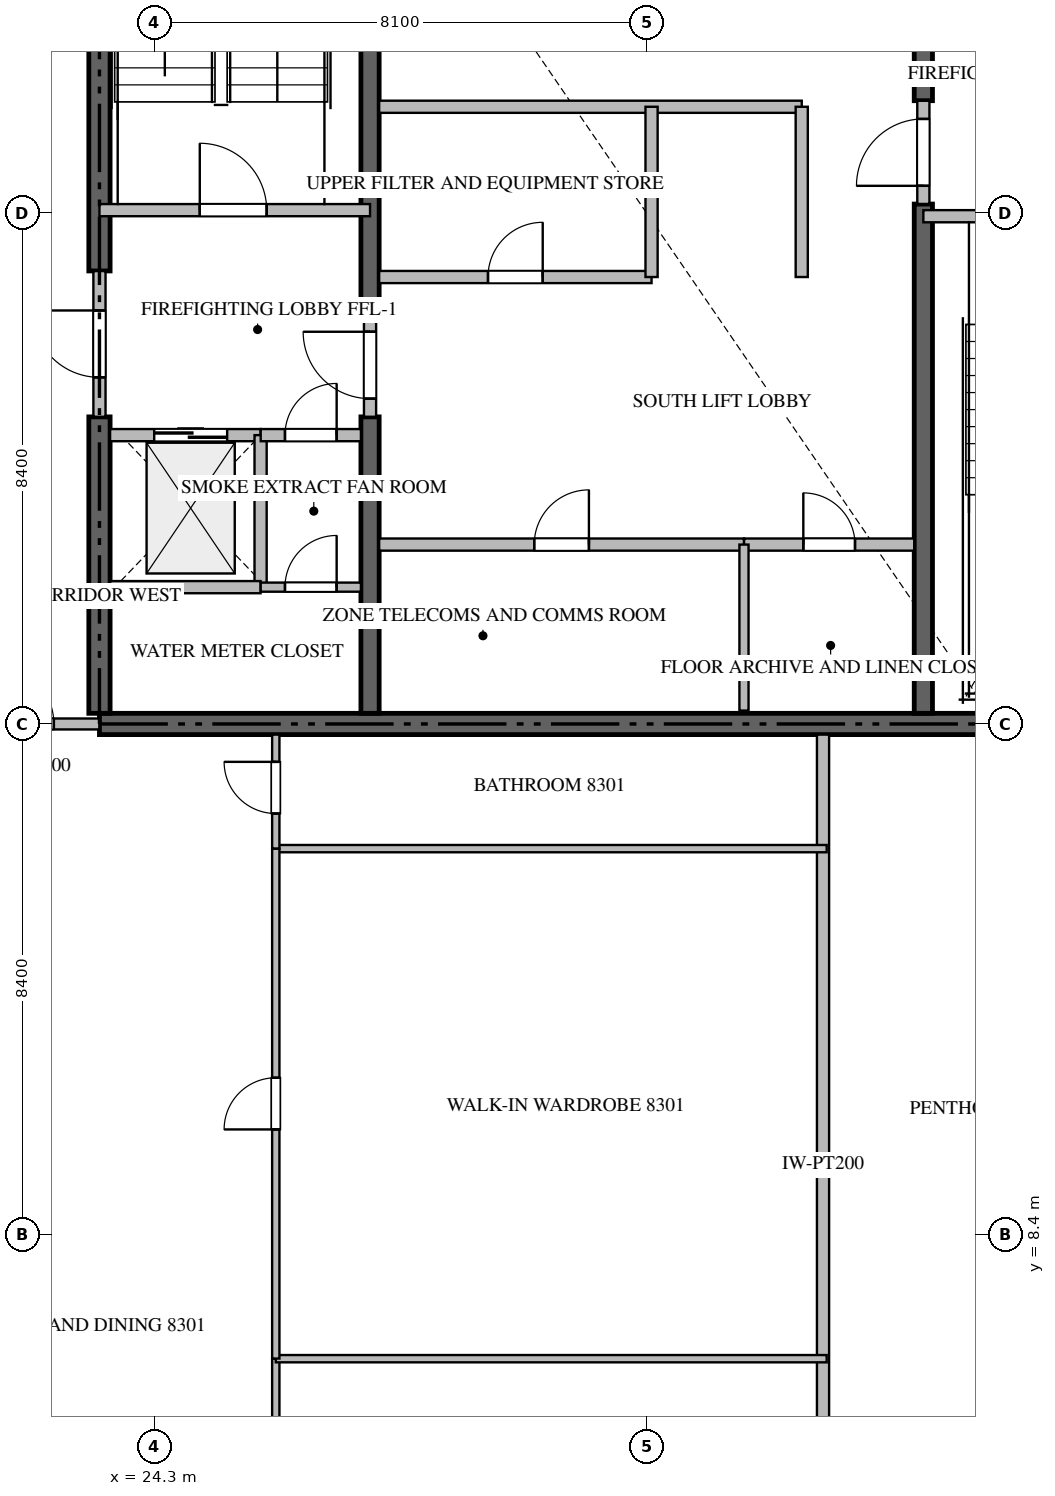
"""IFC4 building model, lengths in metres.
Left out: names, types, materials, properties, quantities, classifications, styles, units other than length and angle.
Written with IfcOpenShell. Run it as: python <this file> out.ifc"""

import sys

from ifc_helpers import new_model, si_unit, direction, frame, frame_2d, origin, place, context, subcontext, project, spatial, rectangle, extrude, source, transform, mapped, element, fill, save


model = new_model("IFC4")
c1 = context("Model", 3, precision=1e-05, world=origin(), true_north=direction((0.0, 1.0)))
c2 = subcontext(c1, "Body", "Model", "MODEL_VIEW")
j1 = project(units=[si_unit("LENGTHUNIT", "METRE"), si_unit("PLANEANGLEUNIT", "RADIAN")], contexts=[c1])
p1 = place(None, origin())
s1 = spatial("IfcSite", under=j1, at=p1, CompositionType="ELEMENT")
p2 = place(p1, origin())
s2 = spatial("IfcBuilding", under=s1, at=p2, CompositionType="ELEMENT")
p3 = place(p2, frame((0.0, 0.0, 333.95)))
s3 = spatial("IfcBuildingStorey", under=s2, at=p3, CompositionType="ELEMENT", Elevation=333.95)
p4 = place(p3, frame((23.4, 16.8, -0.26), z_axis=(0.0, 0.0, 1.0), x_axis=(1.0, 0.0, 0.0)))
e1 = element("IfcWall", 1, at=p4, inside=s3, PredefinedType="SHEAR", context=c2, shape_type="SweptSolid", body=[
    extrude(rectangle(XDim=18.0, YDim=0.35, at=frame_2d((9.0, 0.0))), origin(), (0.0, 0.0, 1.0), 3.868),
])
p5 = place(p3, frame((23.4, 16.975, -0.26), z_axis=(0.0, 0.0, 1.0), x_axis=(0.0, 1.0, 0.0)))
e2 = element("IfcWall", 2, at=p5, inside=s3, PredefinedType="SHEAR", context=c2, shape_type="SweptSolid", body=[
    extrude(rectangle(XDim=4.875, YDim=0.35, at=frame_2d((2.438, 0.0))), origin(), (0.0, 0.0, 1.0), 3.868),
])
p6 = place(p3, frame((23.4, 24.25, -0.26), z_axis=(0.0, 0.0, 1.0), x_axis=(0.0, 1.0, 0.0)))
e3 = element("IfcWall", 3, at=p6, inside=s3, PredefinedType="SHEAR", context=c2, shape_type="SweptSolid", body=[
    extrude(rectangle(XDim=9.175, YDim=0.35, at=frame_2d((4.587, 0.0))), origin(), (0.0, 0.0, 1.0), 3.868),
])
p7 = place(p3, frame((27.85, 16.975, -0.26), z_axis=(0.0, 0.0, 1.0), x_axis=(0.0, 1.0, 0.0)))
e4 = element("IfcWall", 4, at=p7, inside=s3, PredefinedType="SHEAR", context=c2, shape_type="SweptSolid", body=[
    extrude(rectangle(XDim=4.875, YDim=0.3, at=frame_2d((2.438, 0.0))), origin(), (0.0, 0.0, 1.0), 3.868),
])
p8 = place(p3, frame((27.85, 23.55, -0.26), z_axis=(0.0, 0.0, 1.0), x_axis=(0.0, 1.0, 0.0)))
e5 = element("IfcWall", 5, at=p8, inside=s3, PredefinedType="SHEAR", context=c2, shape_type="SweptSolid", body=[
    extrude(rectangle(XDim=9.875, YDim=0.3, at=frame_2d((4.938, 0.0))), origin(), (0.0, 0.0, 1.0), 3.868),
])
p9 = place(p3, frame((36.95, 16.975, -0.26), z_axis=(0.0, 0.0, 1.0), x_axis=(0.0, 1.0, 0.0)))
e6 = element("IfcWall", 6, at=p9, inside=s3, PredefinedType="SHEAR", context=c2, shape_type="SweptSolid", body=[
    extrude(rectangle(XDim=8.375, YDim=0.3, at=frame_2d((4.188, 0.0))), origin(), (0.0, 0.0, 1.0), 3.868),
])
p10 = place(p3, frame((36.95, 27.05, -0.26), z_axis=(0.0, 0.0, 1.0), x_axis=(0.0, 1.0, 0.0)))
e7 = element("IfcWall", 7, at=p10, inside=s3, PredefinedType="SHEAR", context=c2, shape_type="SweptSolid", body=[
    extrude(rectangle(XDim=6.375, YDim=0.3, at=frame_2d((3.188, 0.0))), origin(), (0.0, 0.0, 1.0), 3.868),
])
p11 = place(p3, frame((23.4, 25.25, 0.0), z_axis=(0.0, 0.0, 1.0), x_axis=(1.0, 0.0, 0.0)))
e8 = element("IfcWall", 8, at=p11, inside=s3, PredefinedType="STANDARD", context=c2, shape_type="SweptSolid", body=[
    extrude(rectangle(XDim=4.45, YDim=0.2, at=frame_2d((2.225, 0.0))), origin(), (0.0, 0.0, 1.0), 3.61),
])
p12 = place(p11, frame((1.65, 0.0, 0.0)))
e9 = element("IfcOpeningElement", 9, at=p12, cuts=e8, PredefinedType="OPENING", context=c2, shape_type="SweptSolid", body=[
    extrude(rectangle(XDim=1.1, YDim=2.15, at=frame_2d((0.55, 1.075))), frame((0.0, 0.11, 0.0), z_axis=(0.0, -1.0, 0.0), x_axis=(1.0, 0.0, 0.0)), (0.0, 0.0, 1.0), 0.22),
])
p13 = place(p3, frame((36.95, 25.15, 0.0), z_axis=(0.0, 0.0, 1.0), x_axis=(1.0, 0.0, 0.0)))
e10 = element("IfcWall", 10, at=p13, inside=s3, PredefinedType="STANDARD", context=c2, shape_type="SweptSolid", body=[
    extrude(rectangle(XDim=4.45, YDim=0.2, at=frame_2d((2.225, 0.0))), origin(), (0.0, 0.0, 1.0), 3.61),
])
p14 = place(p13, frame((1.65, 0.0, 0.0)))
e11 = element("IfcOpeningElement", 11, at=p14, cuts=e10, PredefinedType="OPENING", context=c2, shape_type="SweptSolid", body=[
    extrude(rectangle(XDim=1.1, YDim=2.15, at=frame_2d((0.55, 1.075))), frame((0.0, 0.11, 0.0), z_axis=(0.0, -1.0, 0.0), x_axis=(1.0, 0.0, 0.0)), (0.0, 0.0, 1.0), 0.22),
])
p15 = place(p3, frame((23.575, 21.55, 0.0), z_axis=(0.0, 0.0, 1.0), x_axis=(1.0, 0.0, 0.0)))
e12 = element("IfcWall", 12, at=p15, inside=s3, PredefinedType="STANDARD", context=c2, shape_type="SweptSolid", body=[
    extrude(rectangle(XDim=2.475, YDim=0.2, at=frame_2d((1.238, 0.0))), origin(), (0.0, 0.0, 1.0), 3.61),
])
p16 = place(p15, frame((0.725, 0.0, 0.0)))
e13 = element("IfcOpeningElement", 13, at=p16, cuts=e12, PredefinedType="OPENING", context=c2, shape_type="SweptSolid", body=[
    extrude(rectangle(XDim=1.2, YDim=2.2, at=frame_2d((0.6, 1.1))), frame((0.0, 0.11, 0.0), z_axis=(0.0, -1.0, 0.0), x_axis=(1.0, 0.0, 0.0)), (0.0, 0.0, 1.0), 0.22),
])
p17 = place(p3, frame((26.05, 19.05, 0.0), z_axis=(0.0, 0.0, 1.0), x_axis=(0.0, 1.0, 0.0)))
e14 = element("IfcWall", 14, at=p17, inside=s3, PredefinedType="STANDARD", context=c2, shape_type="SweptSolid", body=[
    extrude(rectangle(XDim=2.5, YDim=0.2, at=frame_2d((1.25, 0.0))), origin(), (0.0, 0.0, 1.0), 3.61),
])
p18 = place(p3, frame((23.575, 19.05, 0.0), z_axis=(0.0, 0.0, 1.0), x_axis=(1.0, 0.0, 0.0)))
e15 = element("IfcWall", 15, at=p18, inside=s3, PredefinedType="STANDARD", context=c2, shape_type="SweptSolid", body=[
    extrude(rectangle(XDim=2.475, YDim=0.2, at=frame_2d((1.238, 0.0))), origin(), (0.0, 0.0, 1.0), 3.61),
])
p19 = place(p3, frame((26.052, 21.55, 0.0), z_axis=(0.0, 0.0, 1.0), x_axis=(1.0, 0.0, 0.0)))
e16 = element("IfcWall", 16, at=p19, inside=s3, PredefinedType="STANDARD", context=c2, shape_type="SweptSolid", body=[
    extrude(rectangle(XDim=1.648, YDim=0.2, at=frame_2d((0.824, 0.0))), origin(), (0.0, 0.0, 1.0), 3.61),
])
p20 = place(p19, frame((0.399, 0.0, 0.0)))
e17 = element("IfcOpeningElement", 17, at=p20, cuts=e16, PredefinedType="OPENING", context=c2, shape_type="SweptSolid", body=[
    extrude(rectangle(XDim=0.85, YDim=2.1, at=frame_2d((0.425, 1.05))), frame((0.0, 0.11, 0.0), z_axis=(0.0, -1.0, 0.0), x_axis=(1.0, 0.0, 0.0)), (0.0, 0.0, 1.0), 0.22),
])
p21 = place(p3, frame((23.4, 21.852, 0.0), z_axis=(0.0, 0.0, 1.0), x_axis=(0.0, 1.0, 0.0)))
e18 = element("IfcWall", 18, at=p21, inside=s3, PredefinedType="STANDARD", context=c2, shape_type="SweptSolid", body=[
    extrude(rectangle(XDim=2.396, YDim=0.2, at=frame_2d((1.198, 0.0))), origin(), (0.0, 0.0, 1.0), 3.61),
])
p22 = place(p21, frame((0.648, 0.0, 0.0)))
e19 = element("IfcOpeningElement", 19, at=p22, cuts=e18, PredefinedType="OPENING", context=c2, shape_type="SweptSolid", body=[
    extrude(rectangle(XDim=1.1, YDim=2.15, at=frame_2d((0.55, 1.075))), frame((0.0, 0.11, 0.0), z_axis=(0.0, -1.0, 0.0), x_axis=(1.0, 0.0, 0.0)), (0.0, 0.0, 1.0), 0.22),
])
p23 = place(p3, frame((27.85, 21.852, 0.0), z_axis=(0.0, 0.0, 1.0), x_axis=(0.0, 1.0, 0.0)))
e20 = element("IfcWall", 20, at=p23, inside=s3, PredefinedType="STANDARD", context=c2, shape_type="SweptSolid", body=[
    extrude(rectangle(XDim=1.696, YDim=0.2, at=frame_2d((0.848, 0.0))), origin(), (0.0, 0.0, 1.0), 3.61),
])
p24 = place(p23, frame((0.298, 0.0, 0.0)))
e21 = element("IfcOpeningElement", 21, at=p24, cuts=e20, PredefinedType="OPENING", context=c2, shape_type="SweptSolid", body=[
    extrude(rectangle(XDim=1.1, YDim=2.15, at=frame_2d((0.55, 1.075))), frame((0.0, 0.11, 0.0), z_axis=(0.0, -1.0, 0.0), x_axis=(1.0, 0.0, 0.0)), (0.0, 0.0, 1.0), 0.22),
])
p25 = place(p3, frame((36.95, 25.352, 0.0), z_axis=(0.0, 0.0, 1.0), x_axis=(0.0, 1.0, 0.0)))
e22 = element("IfcWall", 22, at=p25, inside=s3, PredefinedType="STANDARD", context=c2, shape_type="SweptSolid", body=[
    extrude(rectangle(XDim=1.696, YDim=0.2, at=frame_2d((0.848, 0.0))), origin(), (0.0, 0.0, 1.0), 3.61),
])
p26 = place(p25, frame((0.298, 0.0, 0.0)))
e23 = element("IfcOpeningElement", 23, at=p26, cuts=e22, PredefinedType="OPENING", context=c2, shape_type="SweptSolid", body=[
    extrude(rectangle(XDim=1.1, YDim=2.15, at=frame_2d((0.55, 1.075))), frame((0.0, 0.11, 0.0), z_axis=(0.0, -1.0, 0.0), x_axis=(1.0, 0.0, 0.0)), (0.0, 0.0, 1.0), 0.22),
])
p27 = place(p3, frame((26.052, 19.05, 0.0), z_axis=(0.0, 0.0, 1.0), x_axis=(1.0, 0.0, 0.0)))
e24 = element("IfcWall", 24, at=p27, inside=s3, PredefinedType="PARTITIONING", context=c2, shape_type="SweptSolid", body=[
    extrude(rectangle(XDim=1.648, YDim=0.15, at=frame_2d((0.824, 0.0))), origin(), (0.0, 0.0, 1.0), 3.61),
])
p28 = place(p27, frame((0.399, 0.0, 0.0)))
e25 = element("IfcOpeningElement", 25, at=p28, cuts=e24, PredefinedType="OPENING", context=c2, shape_type="SweptSolid", body=[
    extrude(rectangle(XDim=0.85, YDim=2.1, at=frame_2d((0.425, 1.05))), frame((0.0, 0.085, 0.0), z_axis=(0.0, -1.0, 0.0), x_axis=(1.0, 0.0, 0.0)), (0.0, 0.0, 1.0), 0.17),
])
p29 = place(p3, frame((28.0, 19.75, 0.0), z_axis=(0.0, 0.0, 1.0), x_axis=(1.0, 0.0, 0.0)))
e26 = element("IfcWall", 26, at=p29, inside=s3, PredefinedType="STANDARD", context=c2, shape_type="SweptSolid", body=[
    extrude(rectangle(XDim=6.0, YDim=0.2, at=frame_2d((3.0, 0.0))), origin(), (0.0, 0.0, 1.0), 3.61),
])
p30 = place(p29, frame((2.55, 0.0, 0.0)))
e27 = element("IfcOpeningElement", 27, at=p30, cuts=e26, PredefinedType="OPENING", context=c2, shape_type="SweptSolid", body=[
    extrude(rectangle(XDim=0.9, YDim=2.1, at=frame_2d((0.45, 1.05))), frame((0.0, 0.11, 0.0), z_axis=(0.0, -1.0, 0.0), x_axis=(1.0, 0.0, 0.0)), (0.0, 0.0, 1.0), 0.22),
])
p31 = place(p3, frame((34.002, 19.75, 0.0), z_axis=(0.0, 0.0, 1.0), x_axis=(1.0, 0.0, 0.0)))
e28 = element("IfcWall", 28, at=p31, inside=s3, PredefinedType="STANDARD", context=c2, shape_type="SweptSolid", body=[
    extrude(rectangle(XDim=2.798, YDim=0.2, at=frame_2d((1.399, 0.0))), origin(), (0.0, 0.0, 1.0), 3.61),
])
p32 = place(p31, frame((0.974, 0.0, 0.0)))
e29 = element("IfcOpeningElement", 29, at=p32, cuts=e28, PredefinedType="OPENING", context=c2, shape_type="SweptSolid", body=[
    extrude(rectangle(XDim=0.85, YDim=2.1, at=frame_2d((0.425, 1.05))), frame((0.0, 0.11, 0.0), z_axis=(0.0, -1.0, 0.0), x_axis=(1.0, 0.0, 0.0)), (0.0, 0.0, 1.0), 0.22),
])
p33 = place(p3, frame((34.0, 17.02, 0.0), z_axis=(0.0, 0.0, 1.0), x_axis=(0.0, 1.0, 0.0)))
e30 = element("IfcWall", 30, at=p33, inside=s3, PredefinedType="PARTITIONING", context=c2, shape_type="SweptSolid", body=[
    extrude(rectangle(XDim=2.73, YDim=0.15, at=frame_2d((1.365, 0.0))), origin(), (0.0, 0.0, 1.0), 3.61),
])
p34 = place(p3, frame((28.0, 26.95, 0.0), z_axis=(0.0, 0.0, 1.0), x_axis=(1.0, 0.0, 0.0)))
e31 = element("IfcWall", 31, at=p34, inside=s3, PredefinedType="STANDARD", context=c2, shape_type="SweptSolid", body=[
    extrude(rectangle(XDim=6.95, YDim=0.2, at=frame_2d((3.475, 0.0))), origin(), (0.0, 0.0, 1.0), 3.61),
])
p35 = place(p3, frame((34.95, 24.15, 0.0), z_axis=(0.0, 0.0, 1.0), x_axis=(0.0, 1.0, 0.0)))
e32 = element("IfcWall", 32, at=p35, inside=s3, PredefinedType="STANDARD", context=c2, shape_type="SweptSolid", body=[
    extrude(rectangle(XDim=2.8, YDim=0.2, at=frame_2d((1.4, 0.0))), origin(), (0.0, 0.0, 1.0), 3.61),
])
p36 = place(p3, frame((28.0, 24.15, 0.0), z_axis=(0.0, 0.0, 1.0), x_axis=(1.0, 0.0, 0.0)))
e33 = element("IfcWall", 33, at=p36, inside=s3, PredefinedType="STANDARD", context=c2, shape_type="SweptSolid", body=[
    extrude(rectangle(XDim=4.48, YDim=0.2, at=frame_2d((2.24, 0.0))), origin(), (0.0, 0.0, 1.0), 3.61),
])
p37 = place(p36, frame((1.79, 0.0, 0.0)))
e34 = element("IfcOpeningElement", 34, at=p37, cuts=e33, PredefinedType="OPENING", context=c2, shape_type="SweptSolid", body=[
    extrude(rectangle(XDim=0.9, YDim=2.1, at=frame_2d((0.45, 1.05))), frame((0.0, 0.11, 0.0), z_axis=(0.0, -1.0, 0.0), x_axis=(1.0, 0.0, 0.0)), (0.0, 0.0, 1.0), 0.22),
])
p38 = place(p3, frame((32.48, 24.15, 0.0), z_axis=(0.0, 0.0, 1.0), x_axis=(0.0, 1.0, 0.0)))
e35 = element("IfcWall", 35, at=p38, inside=s3, PredefinedType="STANDARD", context=c2, shape_type="SweptSolid", body=[
    extrude(rectangle(XDim=2.8, YDim=0.2, at=frame_2d((1.4, 0.0))), origin(), (0.0, 0.0, 1.0), 3.61),
])
p39 = place(p3, frame((35.3, 2.482, 0.0), z_axis=(0.0, 0.0, 1.0), x_axis=(0.0, 1.0, 0.0)))
e36 = element("IfcWall", 36, at=p39, inside=s3, PredefinedType="PARTITIONING", context=c2, shape_type="SweptSolid", body=[
    extrude(rectangle(XDim=14.143, YDim=0.2, at=frame_2d((7.072, 0.0))), origin(), (0.0, 0.0, 1.0), 3.61),
])
p40 = place(p3, frame((20.902, 16.8, 0.0), z_axis=(0.0, 0.0, 1.0), x_axis=(1.0, 0.0, 0.0)))
e37 = element("IfcWall", 37, at=p40, inside=s3, PredefinedType="PARTITIONING", context=c2, shape_type="SweptSolid", body=[
    extrude(rectangle(XDim=2.496, YDim=0.18, at=frame_2d((1.248, 0.0))), origin(), (0.0, 0.0, 1.0), 3.61),
])
p41 = place(p40, frame((0.748, 0.0, 0.0)))
e38 = element("IfcOpeningElement", 38, at=p41, cuts=e37, PredefinedType="OPENING", context=c2, shape_type="SweptSolid", body=[
    extrude(rectangle(XDim=1.0, YDim=2.15, at=frame_2d((0.5, 1.075))), frame((0.0, 0.1, 0.0), z_axis=(0.0, -1.0, 0.0), x_axis=(1.0, 0.0, 0.0)), (0.0, 0.0, 1.0), 0.2),
])
p42 = place(p3, frame((26.3, 2.495, 0.0), z_axis=(0.0, 0.0, 1.0), x_axis=(0.0, 1.0, 0.0)))
e39 = element("IfcWall", 39, at=p42, inside=s3, PredefinedType="PARTITIONING", context=c2, shape_type="SweptSolid", body=[
    extrude(rectangle(XDim=3.867, YDim=0.12, at=frame_2d((1.934, 0.0))), origin(), (0.0, 0.0, 1.0), 3.61),
])
p43 = place(p42, frame((1.632, 0.0, 0.0)))
e40 = element("IfcOpeningElement", 40, at=p43, cuts=e39, PredefinedType="OPENING", context=c2, shape_type="SweptSolid", body=[
    extrude(rectangle(XDim=0.9, YDim=2.1, at=frame_2d((0.45, 1.05))), frame((0.0, 0.07, 0.0), z_axis=(0.0, -1.0, 0.0), x_axis=(1.0, 0.0, 0.0)), (0.0, 0.0, 1.0), 0.14),
])
for number, where, z_axis, x_axis in (
    (41, (26.3, 6.362, 0.0), (0.0, 0.0, 1.0), (1.0, 0.0, 0.0)),
    (42, (26.3, 14.75, 0.0), (0.0, 0.0, 1.0), (1.0, 0.0, 0.0)),
):
    element("IfcWall", number, at=place(p3, frame(where, z_axis=z_axis, x_axis=x_axis)), inside=s3, PredefinedType="PARTITIONING", context=c2, shape_type="SweptSolid", body=[
        extrude(rectangle(XDim=9.06, YDim=0.12, at=frame_2d((4.53, 0.0))), origin(), (0.0, 0.0, 1.0), 3.61),
    ])
p44 = place(p3, frame((26.3, 6.364, 0.0), z_axis=(0.0, 0.0, 1.0), x_axis=(0.0, 1.0, 0.0)))
e43 = element("IfcWall", 43, at=p44, inside=s3, PredefinedType="PARTITIONING", context=c2, shape_type="SweptSolid", body=[
    extrude(rectangle(XDim=8.386, YDim=0.12, at=frame_2d((4.193, 0.0))), origin(), (0.0, 0.0, 1.0), 3.61),
])
p45 = place(p44, frame((3.768, 0.0, 0.0)))
e44 = element("IfcOpeningElement", 44, at=p45, cuts=e43, PredefinedType="OPENING", context=c2, shape_type="SweptSolid", body=[
    extrude(rectangle(XDim=0.85, YDim=2.1, at=frame_2d((0.425, 1.05))), frame((0.0, 0.07, 0.0), z_axis=(0.0, -1.0, 0.0), x_axis=(1.0, 0.0, 0.0)), (0.0, 0.0, 1.0), 0.14),
])
p46 = place(p3, frame((26.3, 14.752, 0.0), z_axis=(0.0, 0.0, 1.0), x_axis=(0.0, 1.0, 0.0)))
e45 = element("IfcWall", 45, at=p46, inside=s3, PredefinedType="PARTITIONING", context=c2, shape_type="SweptSolid", body=[
    extrude(rectangle(XDim=1.873, YDim=0.12, at=frame_2d((0.937, 0.0))), origin(), (0.0, 0.0, 1.0), 3.61),
])
p47 = place(p46, frame((0.575, 0.0, 0.0)))
e46 = element("IfcOpeningElement", 46, at=p47, cuts=e45, PredefinedType="OPENING", context=c2, shape_type="SweptSolid", body=[
    extrude(rectangle(XDim=0.85, YDim=2.1, at=frame_2d((0.425, 1.05))), frame((0.0, 0.07, 0.0), z_axis=(0.0, -1.0, 0.0), x_axis=(1.0, 0.0, 0.0)), (0.0, 0.0, 1.0), 0.14),
])
m1 = source(origin(), c2, "Body", "SweptSolid", [
    extrude(rectangle(XDim=1.1, YDim=2.15, at=frame_2d((0.55, 1.075))), frame((0.0, 0.025, 0.0), z_axis=(0.0, -1.0, 0.0), x_axis=(1.0, 0.0, 0.0)), (0.0, 0.0, 1.0), 0.05),
])
p48 = place(p12, origin())
e47 = element("IfcDoor", 47, at=p48, inside=s3, OperationType="SINGLE_SWING_LEFT", PredefinedType="DOOR", context=c2, shape_type="MappedRepresentation", body=[
    mapped(m1, transform((0.0, 0.0, 0.0), scale=1.0)),
])
fill(e9, e47)
m2 = source(origin(), c2, "Body", "SweptSolid", [
    extrude(rectangle(XDim=1.2, YDim=2.2, at=frame_2d((0.6, 1.1))), frame((0.0, 0.025, 0.0), z_axis=(0.0, -1.0, 0.0), x_axis=(1.0, 0.0, 0.0)), (0.0, 0.0, 1.0), 0.05),
])
p49 = place(p16, origin())
e48 = element("IfcDoor", 48, at=p49, inside=s3, OperationType="DOUBLE_DOOR_SLIDING", PredefinedType="DOOR", context=c2, shape_type="MappedRepresentation", body=[
    mapped(m2, transform((0.0, 0.0, 0.0), scale=1.0)),
])
fill(e13, e48)
m3 = source(origin(), c2, "Body", "SweptSolid", [
    extrude(rectangle(XDim=0.85, YDim=2.1, at=frame_2d((0.425, 1.05))), frame((0.0, 0.025, 0.0), z_axis=(0.0, -1.0, 0.0), x_axis=(1.0, 0.0, 0.0)), (0.0, 0.0, 1.0), 0.05),
])
p50 = place(p20, origin())
e49 = element("IfcDoor", 49, at=p50, inside=s3, OperationType="SINGLE_SWING_RIGHT", PredefinedType="DOOR", context=c2, shape_type="MappedRepresentation", body=[
    mapped(m3, transform((0.0, 0.0, 0.0), scale=1.0)),
])
fill(e17, e49)
p51 = place(p22, origin())
e50 = element("IfcDoor", 50, at=p51, inside=s3, OperationType="SINGLE_SWING_RIGHT", PredefinedType="DOOR", context=c2, shape_type="MappedRepresentation", body=[
    mapped(m1, transform((0.0, 0.0, 0.0), scale=1.0)),
])
fill(e19, e50)
p52 = place(p24, origin())
e51 = element("IfcDoor", 51, at=p52, inside=s3, OperationType="SINGLE_SWING_RIGHT", PredefinedType="DOOR", context=c2, shape_type="MappedRepresentation", body=[
    mapped(m1, transform((0.0, 0.0, 0.0), scale=1.0)),
])
fill(e21, e51)
p53 = place(p26, origin())
e52 = element("IfcDoor", 52, at=p53, inside=s3, OperationType="SINGLE_SWING_LEFT", PredefinedType="DOOR", context=c2, shape_type="MappedRepresentation", body=[
    mapped(m1, transform((0.0, 0.0, 0.0), scale=1.0)),
])
fill(e23, e52)
p54 = place(p28, origin())
e53 = element("IfcDoor", 53, at=p54, inside=s3, OperationType="SINGLE_SWING_RIGHT", PredefinedType="DOOR", context=c2, shape_type="MappedRepresentation", body=[
    mapped(m3, transform((0.0, 0.0, 0.0), scale=1.0)),
])
fill(e25, e53)
m4 = source(origin(), c2, "Body", "SweptSolid", [
    extrude(rectangle(XDim=0.9, YDim=2.1, at=frame_2d((0.45, 1.05))), frame((0.0, 0.025, 0.0), z_axis=(0.0, -1.0, 0.0), x_axis=(1.0, 0.0, 0.0)), (0.0, 0.0, 1.0), 0.05),
])
p55 = place(p30, origin())
e54 = element("IfcDoor", 54, at=p55, inside=s3, OperationType="SINGLE_SWING_RIGHT", PredefinedType="DOOR", context=c2, shape_type="MappedRepresentation", body=[
    mapped(m4, transform((0.0, 0.0, 0.0), scale=1.0)),
])
fill(e27, e54)
p56 = place(p32, origin())
e55 = element("IfcDoor", 55, at=p56, inside=s3, OperationType="SINGLE_SWING_LEFT", PredefinedType="DOOR", context=c2, shape_type="MappedRepresentation", body=[
    mapped(m3, transform((0.0, 0.0, 0.0), scale=1.0)),
])
fill(e29, e55)
p57 = place(p37, origin())
e56 = element("IfcDoor", 56, at=p57, inside=s3, OperationType="SINGLE_SWING_RIGHT", PredefinedType="DOOR", context=c2, shape_type="MappedRepresentation", body=[
    mapped(m4, transform((0.0, 0.0, 0.0), scale=1.0)),
])
fill(e34, e56)
m5 = source(origin(), c2, "Body", "SweptSolid", [
    extrude(rectangle(XDim=1.0, YDim=2.15, at=frame_2d((0.5, 1.075))), frame((0.0, 0.025, 0.0), z_axis=(0.0, -1.0, 0.0), x_axis=(1.0, 0.0, 0.0)), (0.0, 0.0, 1.0), 0.05),
])
p58 = place(p41, origin())
e57 = element("IfcDoor", 57, at=p58, inside=s3, OperationType="SINGLE_SWING_LEFT", PredefinedType="DOOR", context=c2, shape_type="MappedRepresentation", body=[
    mapped(m5, transform((0.0, 0.0, 0.0), scale=1.0)),
])
fill(e38, e57)
p59 = place(p45, origin())
e58 = element("IfcDoor", 58, at=p59, inside=s3, OperationType="SINGLE_SWING_LEFT", PredefinedType="DOOR", context=c2, shape_type="MappedRepresentation", body=[
    mapped(m3, transform((0.0, 0.0, 0.0), scale=1.0)),
])
fill(e44, e58)
p60 = place(p47, origin())
e59 = element("IfcDoor", 59, at=p60, inside=s3, OperationType="SINGLE_SWING_RIGHT", PredefinedType="DOOR", context=c2, shape_type="MappedRepresentation", body=[
    mapped(m3, transform((0.0, 0.0, 0.0), scale=1.0)),
])
fill(e46, e59)
save(model, sys.argv[1])
